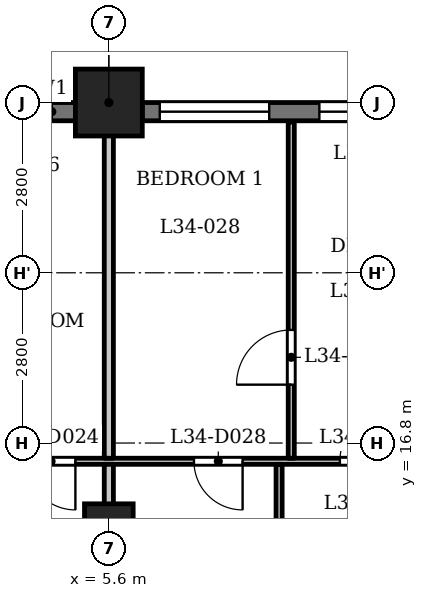
"""IFC4 building model, lengths in metres.
Left out: names, types, materials, properties, quantities, classifications, styles, units other than length and angle.
Written with IfcOpenShell. Run it as: python <this file> out.ifc"""

import sys

from ifc_helpers import new_model, si_unit, direction, frame, frame_2d, origin, origin_2d, place, context, subcontext, project, spatial, rectangle, extrude, element, fill, save


model = new_model("IFC4")
c1 = context("Model", 3, precision=1e-05, world=origin(), true_north=direction((0.0, 1.0)))
c2 = subcontext(c1, "Body", "Model", "MODEL_VIEW")
j1 = project(units=[si_unit("LENGTHUNIT", "METRE"), si_unit("PLANEANGLEUNIT", "RADIAN")], contexts=[c1])
p1 = place(None, origin())
s1 = spatial("IfcSite", under=j1, at=p1, CompositionType="ELEMENT")
p2 = place(p1, origin())
s2 = spatial("IfcBuilding", under=s1, at=p2, CompositionType="ELEMENT")
p3 = place(p2, frame((0.0, 0.0, 136.1)))
s3 = spatial("IfcBuildingStorey", under=s2, at=p3, CompositionType="ELEMENT", Elevation=136.1)
p4 = place(p3, frame((5.6, 22.4, 0.0), z_axis=(0.0, 0.0, 1.0), x_axis=(1.0, 0.0, 0.0)))
e1 = element("IfcColumn", 1, at=p4, inside=s3, PredefinedType="COLUMN", context=c2, shape_type="SweptSolid", body=[
    extrude(rectangle(XDim=1.1, YDim=1.1, at=origin_2d()), origin(), (0.0, 0.0, 1.0), 3.5),
])
p5 = place(p3, frame((5.6, 15.4, 0.0), z_axis=(0.0, 0.0, 1.0), x_axis=(1.0, 0.0, 0.0)))
e2 = element("IfcColumn", 2, at=p5, inside=s3, PredefinedType="COLUMN", context=c2, shape_type="SweptSolid", body=[
    extrude(rectangle(XDim=0.8, YDim=0.8, at=origin_2d()), origin(), (0.0, 0.0, 1.0), 3.5),
])
p6 = place(p3, frame((10.65, 22.25, 0.0), z_axis=(0.0, 0.0, 1.0), x_axis=(-1.0, 0.0, 0.0)))
e3 = element("IfcWall", 3, at=p6, inside=s3, PredefinedType="SOLIDWALL", context=c2, shape_type="SweptSolid", body=[
    extrude(rectangle(XDim=4.5, YDim=0.3, at=frame_2d((2.25, 0.0))), origin(), (0.0, 0.0, 1.0), 2.45),
])
p7 = place(p6, frame((0.387, 0.0, 0.6)))
e4 = element("IfcOpeningElement", 4, at=p7, cuts=e3, PredefinedType="OPENING", context=c2, shape_type="SweptSolid", body=[
    extrude(rectangle(XDim=1.2, YDim=1.55, at=frame_2d((0.6, 0.775))), frame((0.0, 0.16, 0.0), z_axis=(0.0, -1.0, 0.0), x_axis=(1.0, 0.0, 0.0)), (0.0, 0.0, 1.0), 0.32),
])
p8 = place(p6, frame((2.413, 0.0, 0.9)))
e5 = element("IfcOpeningElement", 5, at=p8, cuts=e3, PredefinedType="OPENING", context=c2, shape_type="SweptSolid", body=[
    extrude(rectangle(XDim=1.8, YDim=1.25, at=frame_2d((0.9, 0.625))), frame((0.0, 0.16, 0.0), z_axis=(0.0, -1.0, 0.0), x_axis=(1.0, 0.0, 0.0)), (0.0, 0.0, 1.0), 0.32),
])
p9 = place(p3, frame((5.05, 22.25, 0.0), z_axis=(0.0, 0.0, 1.0), x_axis=(-1.0, 0.0, 0.0)))
e6 = element("IfcWall", 6, at=p9, inside=s3, PredefinedType="SOLIDWALL", context=c2, shape_type="SweptSolid", body=[
    extrude(rectangle(XDim=4.5, YDim=0.3, at=frame_2d((2.25, 0.0))), origin(), (0.0, 0.0, 1.0), 2.45),
])
p10 = place(p9, frame((0.387, 0.0, 0.6)))
e7 = element("IfcOpeningElement", 7, at=p10, cuts=e6, PredefinedType="OPENING", context=c2, shape_type="SweptSolid", body=[
    extrude(rectangle(XDim=1.2, YDim=1.55, at=frame_2d((0.6, 0.775))), frame((0.0, 0.16, 0.0), z_axis=(0.0, -1.0, 0.0), x_axis=(1.0, 0.0, 0.0)), (0.0, 0.0, 1.0), 0.32),
])
p11 = place(p9, frame((2.413, 0.0, 0.9)))
e8 = element("IfcOpeningElement", 8, at=p11, cuts=e6, PredefinedType="OPENING", context=c2, shape_type="SweptSolid", body=[
    extrude(rectangle(XDim=1.8, YDim=1.25, at=frame_2d((0.9, 0.625))), frame((0.0, 0.16, 0.0), z_axis=(0.0, -1.0, 0.0), x_axis=(1.0, 0.0, 0.0)), (0.0, 0.0, 1.0), 0.32),
])
p12 = place(p3, frame((-16.725, 16.5, 0.0), z_axis=(0.0, 0.0, 1.0), x_axis=(1.0, 0.0, 0.0)))
e9 = element("IfcWall", 9, at=p12, inside=s3, PredefinedType="PARTITIONING", context=c2, shape_type="SweptSolid", body=[
    extrude(rectangle(XDim=33.45, YDim=0.1, at=frame_2d((16.725, 0.0))), origin(), (0.0, 0.0, 1.0), 3.2),
])
p13 = place(p12, frame((9.675, 0.0, 0.0)))
e10 = element("IfcOpeningElement", 10, at=p13, cuts=e9, PredefinedType="OPENING", context=c2, shape_type="SweptSolid", body=[
    extrude(rectangle(XDim=0.8, YDim=2.1, at=frame_2d((0.4, 1.05))), frame((0.0, 0.06, 0.0), z_axis=(0.0, -1.0, 0.0), x_axis=(1.0, 0.0, 0.0)), (0.0, 0.0, 1.0), 0.12),
])
p14 = place(p12, frame((3.975, 0.0, 0.0)))
e11 = element("IfcOpeningElement", 11, at=p14, cuts=e9, PredefinedType="OPENING", context=c2, shape_type="SweptSolid", body=[
    extrude(rectangle(XDim=0.9, YDim=2.1, at=frame_2d((0.45, 1.05))), frame((0.0, 0.06, 0.0), z_axis=(0.0, -1.0, 0.0), x_axis=(1.0, 0.0, 0.0)), (0.0, 0.0, 1.0), 0.12),
])
p15 = place(p12, frame((12.025, 0.0, 0.0)))
e12 = element("IfcOpeningElement", 12, at=p15, cuts=e9, PredefinedType="OPENING", context=c2, shape_type="SweptSolid", body=[
    extrude(rectangle(XDim=0.8, YDim=2.1, at=frame_2d((0.4, 1.05))), frame((0.0, 0.06, 0.0), z_axis=(0.0, -1.0, 0.0), x_axis=(1.0, 0.0, 0.0)), (0.0, 0.0, 1.0), 0.12),
])
p16 = place(p12, frame((15.175, 0.0, 0.0)))
e13 = element("IfcOpeningElement", 13, at=p16, cuts=e9, PredefinedType="OPENING", context=c2, shape_type="SweptSolid", body=[
    extrude(rectangle(XDim=0.9, YDim=2.1, at=frame_2d((0.45, 1.05))), frame((0.0, 0.06, 0.0), z_axis=(0.0, -1.0, 0.0), x_axis=(1.0, 0.0, 0.0)), (0.0, 0.0, 1.0), 0.12),
])
p17 = place(p12, frame((20.975, 0.0, 0.0)))
e14 = element("IfcOpeningElement", 14, at=p17, cuts=e9, PredefinedType="OPENING", context=c2, shape_type="SweptSolid", body=[
    extrude(rectangle(XDim=0.8, YDim=2.1, at=frame_2d((0.4, 1.05))), frame((0.0, 0.06, 0.0), z_axis=(0.0, -1.0, 0.0), x_axis=(1.0, 0.0, 0.0)), (0.0, 0.0, 1.0), 0.12),
])
p18 = place(p12, frame((18.175, 0.0, 0.0)))
e15 = element("IfcOpeningElement", 15, at=p18, cuts=e9, PredefinedType="OPENING", context=c2, shape_type="SweptSolid", body=[
    extrude(rectangle(XDim=0.9, YDim=2.1, at=frame_2d((0.45, 1.05))), frame((0.0, 0.06, 0.0), z_axis=(0.0, -1.0, 0.0), x_axis=(1.0, 0.0, 0.0)), (0.0, 0.0, 1.0), 0.12),
])
p19 = place(p12, frame((23.725, 0.0, 0.0)))
e16 = element("IfcOpeningElement", 16, at=p19, cuts=e9, PredefinedType="OPENING", context=c2, shape_type="SweptSolid", body=[
    extrude(rectangle(XDim=0.8, YDim=2.1, at=frame_2d((0.4, 1.05))), frame((0.0, 0.06, 0.0), z_axis=(0.0, -1.0, 0.0), x_axis=(1.0, 0.0, 0.0)), (0.0, 0.0, 1.0), 0.12),
])
p20 = place(p12, frame((26.125, 0.0, 0.0)))
e17 = element("IfcOpeningElement", 17, at=p20, cuts=e9, PredefinedType="OPENING", context=c2, shape_type="SweptSolid", body=[
    extrude(rectangle(XDim=0.9, YDim=2.1, at=frame_2d((0.45, 1.05))), frame((0.0, 0.06, 0.0), z_axis=(0.0, -1.0, 0.0), x_axis=(1.0, 0.0, 0.0)), (0.0, 0.0, 1.0), 0.12),
])
p21 = place(p12, frame((32.125, 0.0, 0.0)))
e18 = element("IfcOpeningElement", 18, at=p21, cuts=e9, PredefinedType="OPENING", context=c2, shape_type="SweptSolid", body=[
    extrude(rectangle(XDim=0.8, YDim=2.1, at=frame_2d((0.4, 1.05))), frame((0.0, 0.06, 0.0), z_axis=(0.0, -1.0, 0.0), x_axis=(1.0, 0.0, 0.0)), (0.0, 0.0, 1.0), 0.12),
])
p22 = place(p12, frame((28.975, 0.0, 0.0)))
e19 = element("IfcOpeningElement", 19, at=p22, cuts=e9, PredefinedType="OPENING", context=c2, shape_type="SweptSolid", body=[
    extrude(rectangle(XDim=0.9, YDim=2.1, at=frame_2d((0.45, 1.05))), frame((0.0, 0.06, 0.0), z_axis=(0.0, -1.0, 0.0), x_axis=(1.0, 0.0, 0.0)), (0.0, 0.0, 1.0), 0.12),
])
p23 = place(p3, frame((5.6, 13.275, 0.0), z_axis=(0.0, 0.0, 1.0), x_axis=(0.0, 1.0, 0.0)))
e20 = element("IfcWall", 20, at=p23, inside=s3, PredefinedType="PARTITIONING", context=c2, shape_type="SweptSolid", body=[
    extrude(rectangle(XDim=3.175, YDim=0.15, at=frame_2d((1.587, 0.0))), origin(), (0.0, 0.0, 1.0), 3.2),
])
p24 = place(p3, frame((5.6, 16.55, 0.0), z_axis=(0.0, 0.0, 1.0), x_axis=(0.0, 1.0, 0.0)))
e21 = element("IfcWall", 21, at=p24, inside=s3, PredefinedType="PARTITIONING", context=c2, shape_type="SweptSolid", body=[
    extrude(rectangle(XDim=6.38, YDim=0.15, at=frame_2d((3.19, 0.0))), origin(), (0.0, 0.0, 1.0), 3.2),
])
p25 = place(p3, frame((8.4, 13.275, 0.0), z_axis=(0.0, 0.0, 1.0), x_axis=(0.0, 1.0, 0.0)))
e22 = element("IfcWall", 22, at=p25, inside=s3, PredefinedType="PARTITIONING", context=c2, shape_type="SweptSolid", body=[
    extrude(rectangle(XDim=3.175, YDim=0.1, at=frame_2d((1.587, 0.0))), origin(), (0.0, 0.0, 1.0), 3.2),
])
p26 = place(p3, frame((8.6, 16.55, 0.0), z_axis=(0.0, 0.0, 1.0), x_axis=(0.0, 1.0, 0.0)))
e23 = element("IfcWall", 23, at=p26, inside=s3, PredefinedType="PARTITIONING", context=c2, shape_type="SweptSolid", body=[
    extrude(rectangle(XDim=5.53, YDim=0.1, at=frame_2d((2.765, 0.0))), origin(), (0.0, 0.0, 1.0), 3.2),
])
p27 = place(p26, frame((1.21, 0.0, 0.0)))
e24 = element("IfcOpeningElement", 24, at=p27, cuts=e23, PredefinedType="OPENING", context=c2, shape_type="SweptSolid", body=[
    extrude(rectangle(XDim=0.9, YDim=2.1, at=frame_2d((0.45, 1.05))), frame((0.0, 0.06, 0.0), z_axis=(0.0, -1.0, 0.0), x_axis=(1.0, 0.0, 0.0)), (0.0, 0.0, 1.0), 0.12),
])
p28 = place(p17, origin())
e25 = element("IfcDoor", 25, at=p28, inside=s3, OperationType="SINGLE_SWING_RIGHT", PredefinedType="DOOR", context=c2, shape_type="SweptSolid", body=[
    extrude(rectangle(XDim=0.8, YDim=2.1, at=frame_2d((0.4, 1.05))), frame((0.0, 0.025, 0.0), z_axis=(0.0, -1.0, 0.0), x_axis=(1.0, 0.0, 0.0)), (0.0, 0.0, 1.0), 0.05),
])
fill(e14, e25)
p29 = place(p19, origin())
e26 = element("IfcDoor", 26, at=p29, inside=s3, OperationType="SINGLE_SWING_RIGHT", PredefinedType="DOOR", context=c2, shape_type="SweptSolid", body=[
    extrude(rectangle(XDim=0.8, YDim=2.1, at=frame_2d((0.4, 1.05))), frame((0.0, 0.025, 0.0), z_axis=(0.0, -1.0, 0.0), x_axis=(1.0, 0.0, 0.0)), (0.0, 0.0, 1.0), 0.05),
])
fill(e16, e26)
p30 = place(p20, origin())
e27 = element("IfcDoor", 27, at=p30, inside=s3, OperationType="SINGLE_SWING_LEFT", PredefinedType="DOOR", context=c2, shape_type="SweptSolid", body=[
    extrude(rectangle(XDim=0.9, YDim=2.1, at=frame_2d((0.45, 1.05))), frame((0.0, 0.025, 0.0), z_axis=(0.0, -1.0, 0.0), x_axis=(1.0, 0.0, 0.0)), (0.0, 0.0, 1.0), 0.05),
])
fill(e17, e27)
p31 = place(p27, origin())
e28 = element("IfcDoor", 28, at=p31, inside=s3, OperationType="SINGLE_SWING_RIGHT", PredefinedType="DOOR", context=c2, shape_type="SweptSolid", body=[
    extrude(rectangle(XDim=0.9, YDim=2.1, at=frame_2d((0.45, 1.05))), frame((0.0, 0.025, 0.0), z_axis=(0.0, -1.0, 0.0), x_axis=(1.0, 0.0, 0.0)), (0.0, 0.0, 1.0), 0.05),
])
fill(e24, e28)
p32 = place(p7, origin())
e29 = element("IfcWindow", 29, at=p32, inside=s3, PartitioningType="SINGLE_PANEL", PredefinedType="WINDOW", context=c2, shape_type="SweptSolid", body=[
    extrude(rectangle(XDim=1.2, YDim=1.55, at=frame_2d((0.6, 0.775))), frame((0.0, 0.03, 0.0), z_axis=(0.0, -1.0, 0.0), x_axis=(1.0, 0.0, 0.0)), (0.0, 0.0, 1.0), 0.06),
])
fill(e4, e29)
p33 = place(p8, origin())
e30 = element("IfcWindow", 30, at=p33, inside=s3, PartitioningType="SINGLE_PANEL", PredefinedType="WINDOW", context=c2, shape_type="SweptSolid", body=[
    extrude(rectangle(XDim=1.8, YDim=1.25, at=frame_2d((0.9, 0.625))), frame((0.0, 0.03, 0.0), z_axis=(0.0, -1.0, 0.0), x_axis=(1.0, 0.0, 0.0)), (0.0, 0.0, 1.0), 0.06),
])
fill(e5, e30)
save(model, sys.argv[1])
